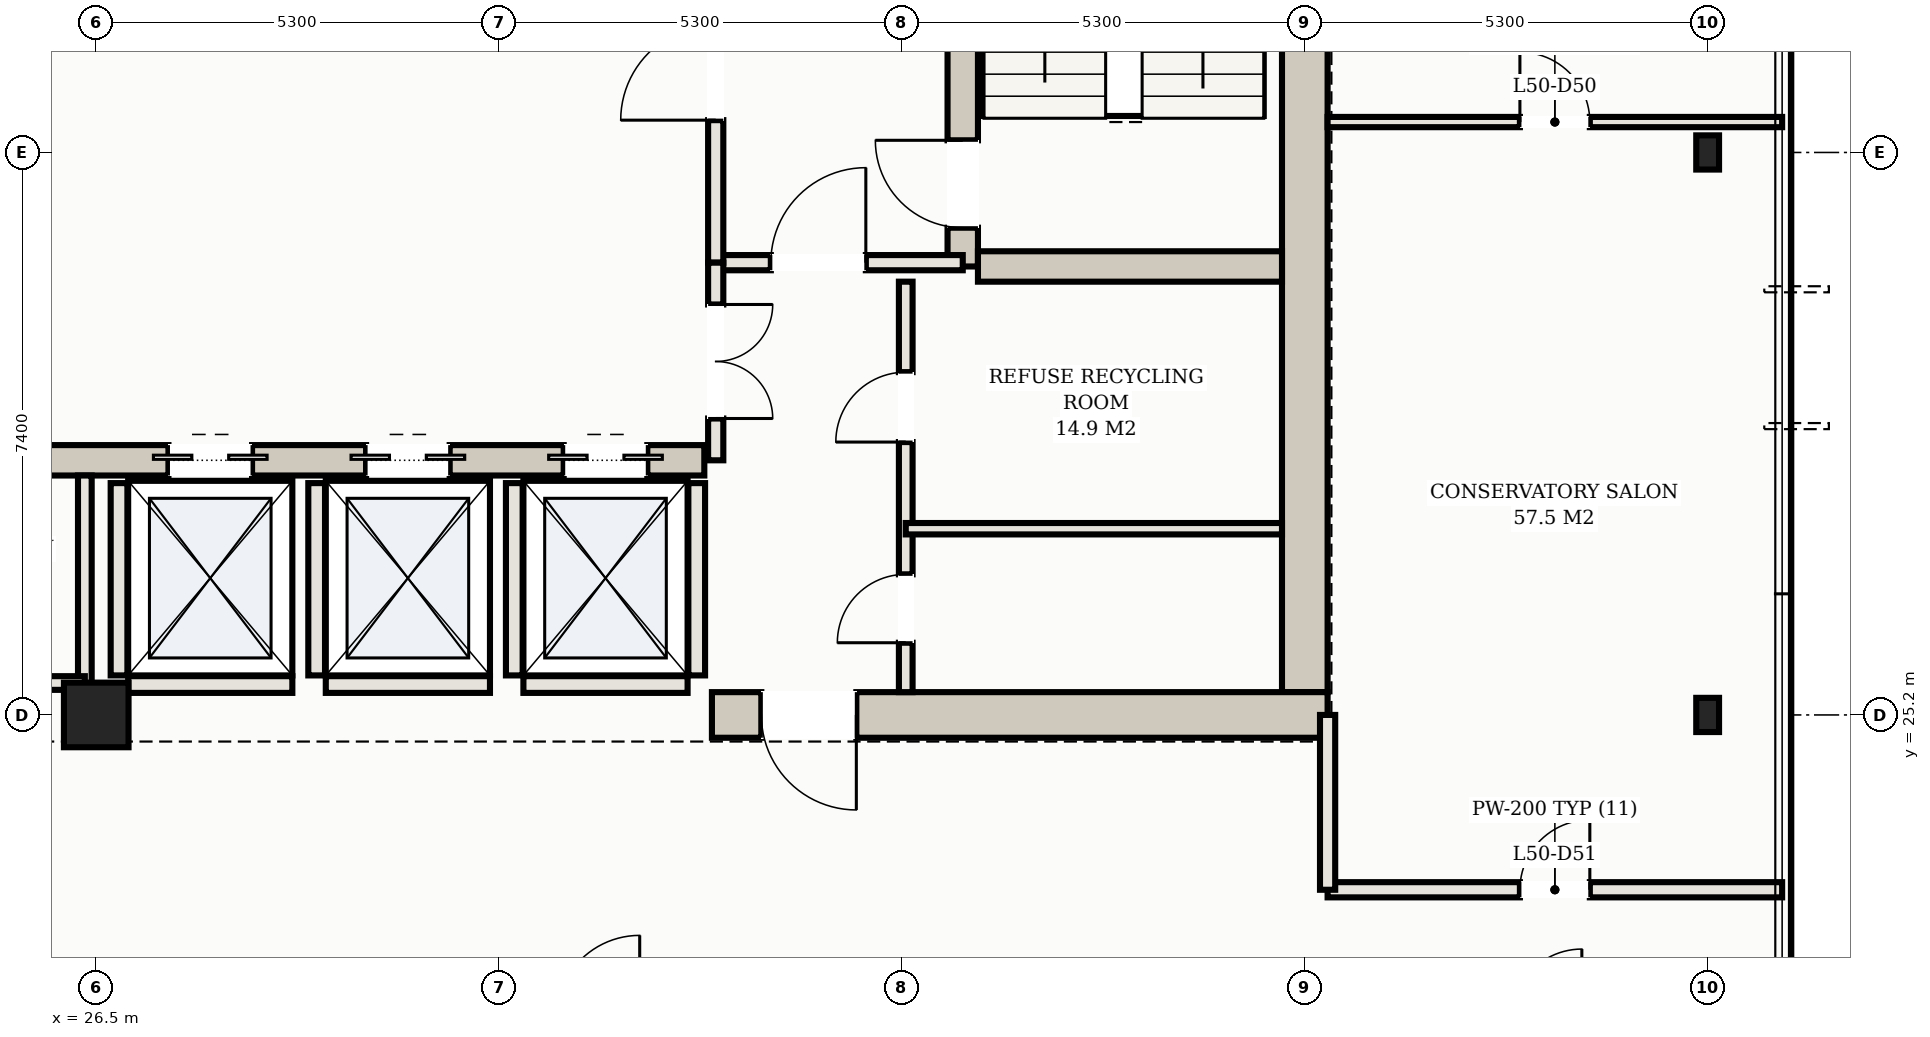
"""IFC4 building model, lengths in metres.
Left out: names, types, materials, properties, quantities, classifications, styles, units other than length and angle.
Written with IfcOpenShell. Run it as: python <this file> out.ifc"""

import sys

from ifc_helpers import new_model, si_unit, direction, frame, frame_2d, origin, origin_2d, place, context, subcontext, project, spatial, rectangle, hollow_rectangle, extrude, element, fill, save


model = new_model("IFC4")
c1 = context("Model", 3, precision=1e-05, world=origin(), true_north=direction((0.0, 1.0)))
c2 = subcontext(c1, "Body", "Model", "MODEL_VIEW")
j1 = project(units=[si_unit("LENGTHUNIT", "METRE"), si_unit("PLANEANGLEUNIT", "RADIAN")], contexts=[c1])
p1 = place(None, origin())
s1 = spatial("IfcSite", under=j1, at=p1, CompositionType="ELEMENT")
p2 = place(p1, origin())
s2 = spatial("IfcBuilding", under=s1, at=p2, CompositionType="ELEMENT")
p3 = place(p2, frame((0.0, 0.0, 182.1)))
s3 = spatial("IfcBuildingStorey", under=s2, at=p3, CompositionType="ELEMENT", Elevation=182.1)
p4 = place(p3, frame((42.4, 25.5, 0.0), z_axis=(0.0, 0.0, 1.0), x_axis=(0.0, 1.0, 0.0)))
e1 = element("IfcWall", 1, at=p4, inside=s3, PredefinedType="SHEAR", context=c2, shape_type="SweptSolid", body=[
    extrude(rectangle(XDim=14.2, YDim=0.6, at=frame_2d((7.1, 0.0))), origin(), (0.0, 0.0, 1.0), 3.03),
])
p5 = place(p3, frame((34.6, 25.2, 0.0), z_axis=(0.0, 0.0, 1.0), x_axis=(1.0, 0.0, 0.0)))
e2 = element("IfcWall", 2, at=p5, inside=s3, PredefinedType="SHEAR", context=c2, shape_type="SweptSolid", body=[
    extrude(rectangle(XDim=8.1, YDim=0.6, at=frame_2d((4.05, 0.0))), origin(), (0.0, 0.0, 1.0), 3.03),
])
p6 = place(p5, frame((0.65, 0.0, 0.0)))
e3 = element("IfcOpeningElement", 3, at=p6, cuts=e2, PredefinedType="OPENING", context=c2, shape_type="SweptSolid", body=[
    extrude(rectangle(XDim=1.25, YDim=2.2, at=frame_2d((0.625, 1.1))), frame((0.0, 0.31, 0.0), z_axis=(0.0, -1.0, 0.0), x_axis=(1.0, 0.0, 0.0)), (0.0, 0.0, 1.0), 0.62),
])
p7 = place(p3, frame((37.9, 31.1, 0.0), z_axis=(0.0, 0.0, 1.0), x_axis=(0.0, 1.0, 0.0)))
e4 = element("IfcWall", 4, at=p7, inside=s3, PredefinedType="SHEAR", context=c2, shape_type="SweptSolid", body=[
    extrude(rectangle(XDim=8.6, YDim=0.4, at=frame_2d((4.3, 0.0))), origin(), (0.0, 0.0, 1.0), 3.03),
])
p8 = place(p7, frame((0.51, 0.0, 0.0)))
e5 = element("IfcOpeningElement", 5, at=p8, cuts=e4, PredefinedType="OPENING", context=c2, shape_type="SweptSolid", body=[
    extrude(rectangle(XDim=1.15, YDim=2.2, at=frame_2d((0.575, 1.1))), frame((0.0, 0.21, 0.0), z_axis=(0.0, -1.0, 0.0), x_axis=(1.0, 0.0, 0.0)), (0.0, 0.0, 1.0), 0.42),
])
p9 = place(p3, frame((38.1, 31.1, 0.0), z_axis=(0.0, 0.0, 1.0), x_axis=(1.0, 0.0, 0.0)))
e6 = element("IfcWall", 6, at=p9, inside=s3, PredefinedType="SHEAR", context=c2, shape_type="SweptSolid", body=[
    extrude(rectangle(XDim=4.0, YDim=0.4, at=frame_2d((2.0, 0.0))), origin(), (0.0, 0.0, 1.0), 3.03),
])
p10 = place(p3, frame((18.5, 28.55, 0.0), z_axis=(0.0, 0.0, 1.0), x_axis=(1.0, 0.0, 0.0)))
e7 = element("IfcWall", 7, at=p10, inside=s3, PredefinedType="SHEAR", context=c2, shape_type="SweptSolid", body=[
    extrude(rectangle(XDim=16.0, YDim=0.4, at=frame_2d((8.0, 0.0))), origin(), (0.0, 0.0, 1.0), 3.03),
])
p11 = place(p10, frame((8.95, 0.0, 0.0)))
e8 = element("IfcOpeningElement", 8, at=p11, cuts=e7, PredefinedType="OPENING", context=c2, shape_type="SweptSolid", body=[
    extrude(rectangle(XDim=1.1, YDim=2.15, at=frame_2d((0.55, 1.075))), frame((0.0, 0.21, 0.0), z_axis=(0.0, -1.0, 0.0), x_axis=(1.0, 0.0, 0.0)), (0.0, 0.0, 1.0), 0.42),
])
p12 = place(p10, frame((11.55, 0.0, 0.0)))
e9 = element("IfcOpeningElement", 9, at=p12, cuts=e7, PredefinedType="OPENING", context=c2, shape_type="SweptSolid", body=[
    extrude(rectangle(XDim=1.1, YDim=2.15, at=frame_2d((0.55, 1.075))), frame((0.0, 0.21, 0.0), z_axis=(0.0, -1.0, 0.0), x_axis=(1.0, 0.0, 0.0)), (0.0, 0.0, 1.0), 0.42),
])
p13 = place(p10, frame((14.15, 0.0, 0.0)))
e10 = element("IfcOpeningElement", 10, at=p13, cuts=e7, PredefinedType="OPENING", context=c2, shape_type="SweptSolid", body=[
    extrude(rectangle(XDim=1.1, YDim=2.15, at=frame_2d((0.55, 1.075))), frame((0.0, 0.21, 0.0), z_axis=(0.0, -1.0, 0.0), x_axis=(1.0, 0.0, 0.0)), (0.0, 0.0, 1.0), 0.42),
])
p14 = place(p3, frame((26.5, 25.2, 0.0), z_axis=(0.0, 0.0, 1.0), x_axis=(1.0, 0.0, 0.0)))
e11 = element("IfcColumn", 11, at=p14, inside=s3, PredefinedType="COLUMN", context=c2, shape_type="SweptSolid", body=[
    extrude(hollow_rectangle(XDim=0.85, YDim=0.85, WallThickness=0.028, at=origin_2d()), origin(), (0.0, 0.0, 1.0), 3.3),
])
for number, where, z_axis, x_axis in (
    (12, (47.7, 25.2, 0.0), (0.0, 0.0, 1.0), (1.0, 0.0, 0.0)),
    (13, (47.7, 32.6, 0.0), (0.0, 0.0, 1.0), (1.0, 0.0, 0.0)),
):
    element("IfcColumn", number, at=place(p3, frame(where, z_axis=z_axis, x_axis=x_axis)), inside=s3, PredefinedType="COLUMN", context=c2, shape_type="SweptSolid", body=[
        extrude(hollow_rectangle(XDim=0.3, YDim=0.45, WallThickness=0.016, at=origin_2d()), origin(), (0.0, 0.0, 1.0), 3.3),
    ])
p15 = place(p3, frame((26.8, 25.72, 0.0), z_axis=(0.0, 0.0, 1.0), x_axis=(0.0, 1.0, 0.0)))
e14 = element("IfcWall", 14, at=p15, inside=s3, PredefinedType="SOLIDWALL", context=c2, shape_type="SweptSolid", body=[
    extrude(rectangle(XDim=2.53, YDim=0.22, at=frame_2d((1.265, 0.0))), origin(), (0.0, 0.0, 1.0), 3.03),
])
p16 = place(p3, frame((26.92, 25.6, 0.0), z_axis=(0.0, 0.0, 1.0), x_axis=(1.0, 0.0, 0.0)))
e15 = element("IfcWall", 15, at=p16, inside=s3, PredefinedType="SOLIDWALL", context=c2, shape_type="SweptSolid", body=[
    extrude(rectangle(XDim=2.16, YDim=0.22, at=frame_2d((1.08, 0.0))), origin(), (0.0, 0.0, 1.0), 2.225),
])
p17 = place(p3, frame((29.4, 25.72, 0.0), z_axis=(0.0, 0.0, 1.0), x_axis=(0.0, 1.0, 0.0)))
e16 = element("IfcWall", 16, at=p17, inside=s3, PredefinedType="SOLIDWALL", context=c2, shape_type="SweptSolid", body=[
    extrude(rectangle(XDim=2.53, YDim=0.22, at=frame_2d((1.265, 0.0))), origin(), (0.0, 0.0, 1.0), 3.03),
])
p18 = place(p3, frame((29.52, 25.6, 0.0), z_axis=(0.0, 0.0, 1.0), x_axis=(1.0, 0.0, 0.0)))
e17 = element("IfcWall", 17, at=p18, inside=s3, PredefinedType="SOLIDWALL", context=c2, shape_type="SweptSolid", body=[
    extrude(rectangle(XDim=2.16, YDim=0.22, at=frame_2d((1.08, 0.0))), origin(), (0.0, 0.0, 1.0), 2.225),
])
for number, where, z_axis, x_axis in (
    (18, (32.0, 25.72, 0.0), (0.0, 0.0, 1.0), (0.0, 1.0, 0.0)),
    (19, (34.4, 25.72, 0.0), (0.0, 0.0, 1.0), (0.0, 1.0, 0.0)),
):
    element("IfcWall", number, at=place(p3, frame(where, z_axis=z_axis, x_axis=x_axis)), inside=s3, PredefinedType="SOLIDWALL", context=c2, shape_type="SweptSolid", body=[
        extrude(rectangle(XDim=2.53, YDim=0.22, at=frame_2d((1.265, 0.0))), origin(), (0.0, 0.0, 1.0), 3.03),
    ])
p19 = place(p3, frame((32.12, 25.6, 0.0), z_axis=(0.0, 0.0, 1.0), x_axis=(1.0, 0.0, 0.0)))
e20 = element("IfcWall", 20, at=p19, inside=s3, PredefinedType="SOLIDWALL", context=c2, shape_type="SweptSolid", body=[
    extrude(rectangle(XDim=2.16, YDim=0.22, at=frame_2d((1.08, 0.0))), origin(), (0.0, 0.0, 1.0), 2.225),
])
p20 = place(p3, frame((34.65, 31.15, 0.0), z_axis=(0.0, 0.0, 1.0), x_axis=(1.0, 0.0, 0.0)))
e21 = element("IfcWall", 21, at=p20, inside=s3, PredefinedType="PARTITIONING", context=c2, shape_type="SweptSolid", body=[
    extrude(rectangle(XDim=3.25, YDim=0.2, at=frame_2d((1.625, 0.0))), origin(), (0.0, 0.0, 1.0), 2.57),
])
p21 = place(p20, frame((0.725, 0.0, 0.0)))
e22 = element("IfcOpeningElement", 22, at=p21, cuts=e21, PredefinedType="OPENING", context=c2, shape_type="SweptSolid", body=[
    extrude(rectangle(XDim=1.25, YDim=2.2, at=frame_2d((0.625, 1.1))), frame((0.0, 0.11, 0.0), z_axis=(0.0, -1.0, 0.0), x_axis=(1.0, 0.0, 0.0)), (0.0, 0.0, 1.0), 0.22),
])
p22 = place(p3, frame((34.65, 31.15, 0.0), z_axis=(0.0, 0.0, 1.0), x_axis=(0.0, 1.0, 0.0)))
e23 = element("IfcWall", 23, at=p22, inside=s3, PredefinedType="PARTITIONING", context=c2, shape_type="SweptSolid", body=[
    extrude(rectangle(XDim=5.15, YDim=0.2, at=frame_2d((2.575, 0.0))), origin(), (0.0, 0.0, 1.0), 2.57),
])
p23 = place(p22, frame((1.875, 0.0, 0.0)))
e24 = element("IfcOpeningElement", 24, at=p23, cuts=e23, PredefinedType="OPENING", context=c2, shape_type="SweptSolid", body=[
    extrude(rectangle(XDim=1.25, YDim=2.2, at=frame_2d((0.625, 1.1))), frame((0.0, 0.11, 0.0), z_axis=(0.0, -1.0, 0.0), x_axis=(1.0, 0.0, 0.0)), (0.0, 0.0, 1.0), 0.22),
])
p24 = place(p3, frame((37.15, 25.5, 0.0), z_axis=(0.0, 0.0, 1.0), x_axis=(0.0, 1.0, 0.0)))
e25 = element("IfcWall", 25, at=p24, inside=s3, PredefinedType="PARTITIONING", context=c2, shape_type="SweptSolid", body=[
    extrude(rectangle(XDim=5.4, YDim=0.18, at=frame_2d((2.7, 0.0))), origin(), (0.0, 0.0, 1.0), 2.57),
])
p25 = place(p24, frame((0.65, 0.0, 0.0)))
e26 = element("IfcOpeningElement", 26, at=p25, cuts=e25, PredefinedType="OPENING", context=c2, shape_type="SweptSolid", body=[
    extrude(rectangle(XDim=0.9, YDim=2.15, at=frame_2d((0.45, 1.075))), frame((0.0, 0.1, 0.0), z_axis=(0.0, -1.0, 0.0), x_axis=(1.0, 0.0, 0.0)), (0.0, 0.0, 1.0), 0.2),
])
p26 = place(p24, frame((3.29, 0.0, 0.0)))
e27 = element("IfcOpeningElement", 27, at=p26, cuts=e25, PredefinedType="OPENING", context=c2, shape_type="SweptSolid", body=[
    extrude(rectangle(XDim=0.92, YDim=2.15, at=frame_2d((0.46, 1.075))), frame((0.0, 0.1, 0.0), z_axis=(0.0, -1.0, 0.0), x_axis=(1.0, 0.0, 0.0)), (0.0, 0.0, 1.0), 0.2),
])
p27 = place(p3, frame((37.15, 27.65, 0.0), z_axis=(0.0, 0.0, 1.0), x_axis=(1.0, 0.0, 0.0)))
e28 = element("IfcWall", 28, at=p27, inside=s3, PredefinedType="PARTITIONING", context=c2, shape_type="SweptSolid", body=[
    extrude(rectangle(XDim=4.95, YDim=0.15, at=frame_2d((2.475, 0.0))), origin(), (0.0, 0.0, 1.0), 2.57),
])
p28 = place(p3, frame((34.65, 28.55, 0.0), z_axis=(0.0, 0.0, 1.0), x_axis=(0.0, 1.0, 0.0)))
e29 = element("IfcWall", 29, at=p28, inside=s3, PredefinedType="PARTITIONING", context=c2, shape_type="SweptSolid", body=[
    extrude(rectangle(XDim=2.6, YDim=0.2, at=frame_2d((1.3, 0.0))), origin(), (0.0, 0.0, 1.0), 2.57),
])
p29 = place(p28, frame((0.55, 0.0, 0.0)))
e30 = element("IfcOpeningElement", 30, at=p29, cuts=e29, PredefinedType="OPENING", context=c2, shape_type="SweptSolid", body=[
    extrude(rectangle(XDim=1.5, YDim=2.25, at=frame_2d((0.75, 1.125))), frame((0.0, 0.11, 0.0), z_axis=(0.0, -1.0, 0.0), x_axis=(1.0, 0.0, 0.0)), (0.0, 0.0, 1.0), 0.22),
])
p30 = place(p3, frame((26.35, 25.62, 0.0), z_axis=(0.0, 0.0, 1.0), x_axis=(0.0, 1.0, 0.0)))
e31 = element("IfcWall", 31, at=p30, inside=s3, PredefinedType="PARTITIONING", context=c2, shape_type="SweptSolid", body=[
    extrude(rectangle(XDim=2.73, YDim=0.18, at=frame_2d((1.365, 0.0))), origin(), (0.0, 0.0, 1.0), 2.57),
])
p31 = place(p3, frame((18.45, 25.62, 0.0), z_axis=(0.0, 0.0, 1.0), x_axis=(1.0, 0.0, 0.0)))
e32 = element("IfcWall", 32, at=p31, inside=s3, PredefinedType="PARTITIONING", context=c2, shape_type="SweptSolid", body=[
    extrude(rectangle(XDim=7.9, YDim=0.18, at=frame_2d((3.95, 0.0))), origin(), (0.0, 0.0, 1.0), 2.57),
])
p32 = place(p31, frame((3.34, 0.0, 0.0)))
e33 = element("IfcOpeningElement", 33, at=p32, cuts=e32, PredefinedType="OPENING", context=c2, shape_type="SweptSolid", body=[
    extrude(rectangle(XDim=0.92, YDim=2.15, at=frame_2d((0.46, 1.075))), frame((0.0, 0.1, 0.0), z_axis=(0.0, -1.0, 0.0), x_axis=(1.0, 0.0, 0.0)), (0.0, 0.0, 1.0), 0.2),
])
p33 = place(p3, frame((42.7, 22.9, 0.0), z_axis=(0.0, 0.0, 1.0), x_axis=(1.0, 0.0, 0.0)))
e34 = element("IfcWall", 34, at=p33, inside=s3, PredefinedType="PARTITIONING", context=c2, shape_type="SweptSolid", body=[
    extrude(rectangle(XDim=5.98, YDim=0.2, at=frame_2d((2.99, 0.0))), origin(), (0.0, 0.0, 1.0), 2.57),
])
p34 = place(p33, frame((2.53, 0.0, 0.0)))
e35 = element("IfcOpeningElement", 35, at=p34, cuts=e34, PredefinedType="OPENING", context=c2, shape_type="SweptSolid", body=[
    extrude(rectangle(XDim=0.92, YDim=2.15, at=frame_2d((0.46, 1.075))), frame((0.0, 0.11, 0.0), z_axis=(0.0, -1.0, 0.0), x_axis=(1.0, 0.0, 0.0)), (0.0, 0.0, 1.0), 0.22),
])
p35 = place(p3, frame((42.7, 22.9, 0.0), z_axis=(0.0, 0.0, 1.0), x_axis=(0.0, 1.0, 0.0)))
e36 = element("IfcWall", 36, at=p35, inside=s3, PredefinedType="PARTITIONING", context=c2, shape_type="SweptSolid", body=[
    extrude(rectangle(XDim=2.3, YDim=0.2, at=frame_2d((1.15, 0.0))), origin(), (0.0, 0.0, 1.0), 2.325),
])
p36 = place(p3, frame((42.7, 33.0, 0.0), z_axis=(0.0, 0.0, 1.0), x_axis=(1.0, 0.0, 0.0)))
e37 = element("IfcWall", 37, at=p36, inside=s3, PredefinedType="PARTITIONING", context=c2, shape_type="SweptSolid", body=[
    extrude(rectangle(XDim=5.98, YDim=0.135, at=frame_2d((2.99, 0.0))), origin(), (0.0, 0.0, 1.0), 2.57),
])
p37 = place(p36, frame((2.53, 0.0, 0.0)))
e38 = element("IfcOpeningElement", 38, at=p37, cuts=e37, PredefinedType="OPENING", context=c2, shape_type="SweptSolid", body=[
    extrude(rectangle(XDim=0.92, YDim=2.15, at=frame_2d((0.46, 1.075))), frame((0.0, 0.078, 0.0), z_axis=(0.0, -1.0, 0.0), x_axis=(1.0, 0.0, 0.0)), (0.0, 0.0, 1.0), 0.155),
])
p38 = place(p11, origin())
e39 = element("IfcDoor", 39, at=p38, inside=s3, OperationType="DOUBLE_DOOR_SLIDING", PredefinedType="DOOR", context=c2, shape_type="SweptSolid", body=[
    extrude(rectangle(XDim=1.1, YDim=2.15, at=frame_2d((0.55, 1.075))), frame((0.0, 0.025, 0.0), z_axis=(0.0, -1.0, 0.0), x_axis=(1.0, 0.0, 0.0)), (0.0, 0.0, 1.0), 0.05),
])
fill(e8, e39)
p39 = place(p12, origin())
e40 = element("IfcDoor", 40, at=p39, inside=s3, OperationType="DOUBLE_DOOR_SLIDING", PredefinedType="DOOR", context=c2, shape_type="SweptSolid", body=[
    extrude(rectangle(XDim=1.1, YDim=2.15, at=frame_2d((0.55, 1.075))), frame((0.0, 0.025, 0.0), z_axis=(0.0, -1.0, 0.0), x_axis=(1.0, 0.0, 0.0)), (0.0, 0.0, 1.0), 0.05),
])
fill(e9, e40)
p40 = place(p13, origin())
e41 = element("IfcDoor", 41, at=p40, inside=s3, OperationType="DOUBLE_DOOR_SLIDING", PredefinedType="DOOR", context=c2, shape_type="SweptSolid", body=[
    extrude(rectangle(XDim=1.1, YDim=2.15, at=frame_2d((0.55, 1.075))), frame((0.0, 0.025, 0.0), z_axis=(0.0, -1.0, 0.0), x_axis=(1.0, 0.0, 0.0)), (0.0, 0.0, 1.0), 0.05),
])
fill(e10, e41)
p41 = place(p6, frame((1.25, 0.0, 0.0), z_axis=(0.0, 0.0, 1.0), x_axis=(-1.0, 0.0, 0.0)))
e42 = element("IfcDoor", 42, at=p41, inside=s3, OperationType="SINGLE_SWING_LEFT", PredefinedType="DOOR", context=c2, shape_type="SweptSolid", body=[
    extrude(rectangle(XDim=1.25, YDim=2.2, at=frame_2d((0.625, 1.1))), frame((0.0, 0.025, 0.0), z_axis=(0.0, -1.0, 0.0), x_axis=(1.0, 0.0, 0.0)), (0.0, 0.0, 1.0), 0.05),
])
fill(e3, e42)
p42 = place(p21, origin())
e43 = element("IfcDoor", 43, at=p42, inside=s3, OperationType="SINGLE_SWING_RIGHT", PredefinedType="DOOR", context=c2, shape_type="SweptSolid", body=[
    extrude(rectangle(XDim=1.25, YDim=2.2, at=frame_2d((0.625, 1.1))), frame((0.0, 0.025, 0.0), z_axis=(0.0, -1.0, 0.0), x_axis=(1.0, 0.0, 0.0)), (0.0, 0.0, 1.0), 0.05),
])
fill(e22, e43)
p43 = place(p23, origin())
e44 = element("IfcDoor", 44, at=p43, inside=s3, OperationType="SINGLE_SWING_LEFT", PredefinedType="DOOR", context=c2, shape_type="SweptSolid", body=[
    extrude(rectangle(XDim=1.25, YDim=2.2, at=frame_2d((0.625, 1.1))), frame((0.0, 0.025, 0.0), z_axis=(0.0, -1.0, 0.0), x_axis=(1.0, 0.0, 0.0)), (0.0, 0.0, 1.0), 0.05),
])
fill(e24, e44)
p44 = place(p8, origin())
e45 = element("IfcDoor", 45, at=p44, inside=s3, OperationType="SINGLE_SWING_RIGHT", PredefinedType="DOOR", context=c2, shape_type="SweptSolid", body=[
    extrude(rectangle(XDim=1.15, YDim=2.2, at=frame_2d((0.575, 1.1))), frame((0.0, 0.025, 0.0), z_axis=(0.0, -1.0, 0.0), x_axis=(1.0, 0.0, 0.0)), (0.0, 0.0, 1.0), 0.05),
])
fill(e5, e45)
p45 = place(p25, origin())
e46 = element("IfcDoor", 46, at=p45, inside=s3, OperationType="SINGLE_SWING_LEFT", PredefinedType="DOOR", context=c2, shape_type="SweptSolid", body=[
    extrude(rectangle(XDim=0.9, YDim=2.15, at=frame_2d((0.45, 1.075))), frame((0.0, 0.025, 0.0), z_axis=(0.0, -1.0, 0.0), x_axis=(1.0, 0.0, 0.0)), (0.0, 0.0, 1.0), 0.05),
])
fill(e26, e46)
p46 = place(p26, origin())
e47 = element("IfcDoor", 47, at=p46, inside=s3, OperationType="SINGLE_SWING_LEFT", PredefinedType="DOOR", context=c2, shape_type="SweptSolid", body=[
    extrude(rectangle(XDim=0.92, YDim=2.15, at=frame_2d((0.46, 1.075))), frame((0.0, 0.025, 0.0), z_axis=(0.0, -1.0, 0.0), x_axis=(1.0, 0.0, 0.0)), (0.0, 0.0, 1.0), 0.05),
])
fill(e27, e47)
p47 = place(p29, frame((1.5, 0.0, 0.0), z_axis=(0.0, 0.0, 1.0), x_axis=(-1.0, 0.0, 0.0)))
e48 = element("IfcDoor", 48, at=p47, inside=s3, OperationType="DOUBLE_DOOR_SINGLE_SWING", PredefinedType="DOOR", context=c2, shape_type="SweptSolid", body=[
    extrude(rectangle(XDim=1.5, YDim=2.25, at=frame_2d((0.75, 1.125))), frame((0.0, 0.025, 0.0), z_axis=(0.0, -1.0, 0.0), x_axis=(1.0, 0.0, 0.0)), (0.0, 0.0, 1.0), 0.05),
])
fill(e30, e48)
p48 = place(p37, origin())
e49 = element("IfcDoor", 49, at=p48, inside=s3, OperationType="SINGLE_SWING_LEFT", PredefinedType="DOOR", context=c2, shape_type="SweptSolid", body=[
    extrude(rectangle(XDim=0.92, YDim=2.15, at=frame_2d((0.46, 1.075))), frame((0.0, 0.025, 0.0), z_axis=(0.0, -1.0, 0.0), x_axis=(1.0, 0.0, 0.0)), (0.0, 0.0, 1.0), 0.05),
])
fill(e38, e49)
p49 = place(p34, origin())
e50 = element("IfcDoor", 50, at=p49, inside=s3, OperationType="SINGLE_SWING_RIGHT", PredefinedType="DOOR", context=c2, shape_type="SweptSolid", body=[
    extrude(rectangle(XDim=0.92, YDim=2.15, at=frame_2d((0.46, 1.075))), frame((0.0, 0.025, 0.0), z_axis=(0.0, -1.0, 0.0), x_axis=(1.0, 0.0, 0.0)), (0.0, 0.0, 1.0), 0.05),
])
fill(e35, e50)
save(model, sys.argv[1])
